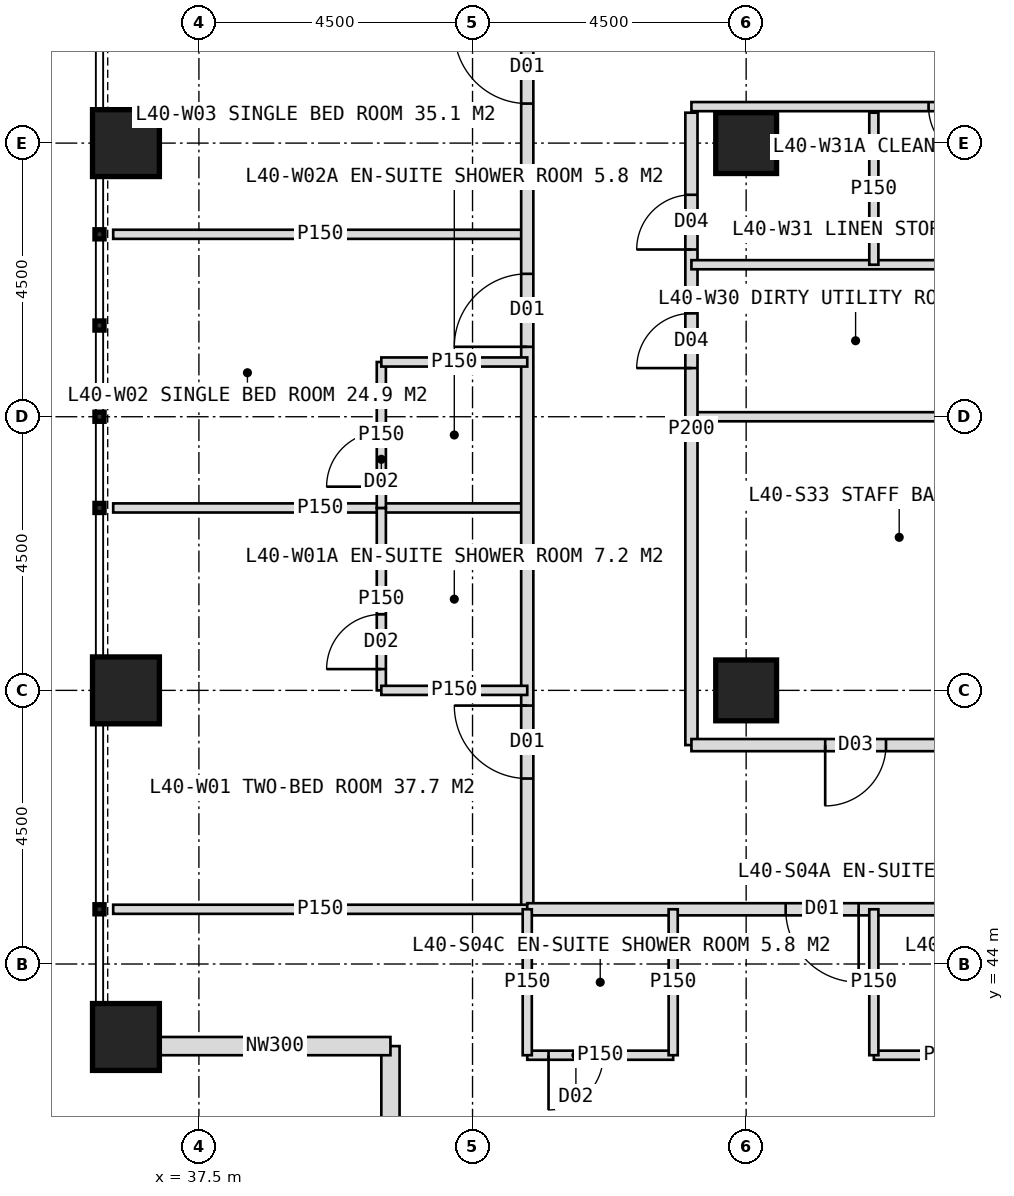
"""IFC4 building model, lengths in metres.
Left out: names, types, materials, properties, quantities, classifications, styles, units other than length and angle.
Written with IfcOpenShell. Run it as: python <this file> out.ifc"""

import sys

from ifc_helpers import new_model, si_unit, direction, frame, frame_2d, origin, origin_2d, place, context, subcontext, project, spatial, rectangle, hollow_rectangle, extrude, element, fill, save


model = new_model("IFC4")
c1 = context("Model", 3, precision=1e-05, world=origin(), true_north=direction((0.0, 1.0)))
c2 = subcontext(c1, "Body", "Model", "MODEL_VIEW")
j1 = project(units=[si_unit("LENGTHUNIT", "METRE"), si_unit("PLANEANGLEUNIT", "RADIAN")], contexts=[c1])
p1 = place(None, origin())
s1 = spatial("IfcSite", under=j1, at=p1, CompositionType="ELEMENT")
p2 = place(p1, origin())
s2 = spatial("IfcBuilding", under=s1, at=p2, CompositionType="ELEMENT")
p3 = place(p2, frame((0.0, 0.0, 168.0)))
s3 = spatial("IfcBuildingStorey", under=s2, at=p3, CompositionType="ELEMENT", Elevation=168.0)
for number, where, z_axis, x_axis in (
    (1, (46.5, 48.5, 0.0), (0.0, 0.0, 1.0), (1.0, 0.0, 0.0)),
    (2, (46.5, 57.5, 0.0), (0.0, 0.0, 1.0), (1.0, 0.0, 0.0)),
):
    element("IfcColumn", number, at=place(p3, frame(where, z_axis=z_axis, x_axis=x_axis)), inside=s3, PredefinedType="COLUMN", context=c2, shape_type="SweptSolid", body=[
        extrude(hollow_rectangle(XDim=1.0, YDim=1.0, WallThickness=0.1, at=origin_2d()), origin(), (0.0, 0.0, 1.0), 4.0),
    ])
for number, where, z_axis, x_axis in (
    (3, (36.3, 42.8, 0.0), (0.0, 0.0, 1.0), (1.0, 0.0, 0.0)),
    (4, (36.3, 48.5, 0.0), (0.0, 0.0, 1.0), (1.0, 0.0, 0.0)),
    (5, (36.3, 57.5, 0.0), (0.0, 0.0, 1.0), (1.0, 0.0, 0.0)),
):
    element("IfcColumn", number, at=place(p3, frame(where, z_axis=z_axis, x_axis=x_axis)), inside=s3, PredefinedType="COLUMN", context=c2, shape_type="SweptSolid", body=[
        extrude(hollow_rectangle(XDim=1.1, YDim=1.1, WallThickness=0.1, at=origin_2d()), origin(), (0.0, 0.0, 1.0), 4.0),
    ])
for number, where, z_axis, x_axis in (
    (6, (40.65, 38.85, 0.0), (0.0, 0.0, 1.0), (0.0, 1.0, 0.0)),
    (7, (40.65, 42.65, 0.0), (0.0, 0.0, 1.0), (-1.0, 0.0, 0.0)),
):
    element("IfcWall", number, at=place(p3, frame(where, z_axis=z_axis, x_axis=x_axis)), inside=s3, PredefinedType="ELEMENTEDWALL", context=c2, shape_type="SweptSolid", body=[
        extrude(rectangle(XDim=3.8, YDim=0.3, at=frame_2d((1.9, 0.0))), origin(), (0.0, 0.0, 1.0), 4.0),
    ])
for number, where, z_axis, x_axis in (
    (8, (42.9, 51.5, 0.0), (0.0, 0.0, 1.0), (-1.0, 0.0, 0.0)),
    (9, (42.9, 56.0, 0.0), (0.0, 0.0, 1.0), (-1.0, 0.0, 0.0)),
):
    element("IfcWall", number, at=place(p3, frame(where, z_axis=z_axis, x_axis=x_axis)), inside=s3, PredefinedType="PARTITIONING", context=c2, shape_type="SweptSolid", body=[
        extrude(rectangle(XDim=6.81, YDim=0.15, at=frame_2d((3.405, 0.0))), origin(), (0.0, 0.0, 1.0), 3.75),
    ])
p4 = place(p3, frame((42.9, 44.9, 0.0), z_axis=(0.0, 0.0, 1.0), x_axis=(0.0, 1.0, 0.0)))
e10 = element("IfcWall", 10, at=p4, inside=s3, PredefinedType="PARTITIONING", context=c2, shape_type="SweptSolid", body=[
    extrude(rectangle(XDim=34.2, YDim=0.2, at=frame_2d((17.1, 0.0))), origin(), (0.0, 0.0, 1.0), 3.75),
])
p5 = place(p4, frame((2.15, 0.0, 0.0)))
e11 = element("IfcOpeningElement", 11, at=p5, cuts=e10, PredefinedType="OPENING", context=c2, shape_type="SweptSolid", body=[
    extrude(rectangle(XDim=1.2, YDim=2.2, at=frame_2d((0.6, 1.1))), frame((0.0, 0.11, 0.0), z_axis=(0.0, -1.0, 0.0), x_axis=(1.0, 0.0, 0.0)), (0.0, 0.0, 1.0), 0.22),
])
p6 = place(p4, frame((9.25, 0.0, 0.0)))
e12 = element("IfcOpeningElement", 12, at=p6, cuts=e10, PredefinedType="OPENING", context=c2, shape_type="SweptSolid", body=[
    extrude(rectangle(XDim=1.2, YDim=2.2, at=frame_2d((0.6, 1.1))), frame((0.0, 0.11, 0.0), z_axis=(0.0, -1.0, 0.0), x_axis=(1.0, 0.0, 0.0)), (0.0, 0.0, 1.0), 0.22),
])
p7 = place(p4, frame((13.25, 0.0, 0.0)))
e13 = element("IfcOpeningElement", 13, at=p7, cuts=e10, PredefinedType="OPENING", context=c2, shape_type="SweptSolid", body=[
    extrude(rectangle(XDim=1.2, YDim=2.2, at=frame_2d((0.6, 1.1))), frame((0.0, 0.11, 0.0), z_axis=(0.0, -1.0, 0.0), x_axis=(1.0, 0.0, 0.0)), (0.0, 0.0, 1.0), 0.22),
])
p8 = place(p4, frame((19.75, 0.0, 0.0)))
e14 = element("IfcOpeningElement", 14, at=p8, cuts=e10, PredefinedType="OPENING", context=c2, shape_type="SweptSolid", body=[
    extrude(rectangle(XDim=1.2, YDim=2.2, at=frame_2d((0.6, 1.1))), frame((0.0, 0.11, 0.0), z_axis=(0.0, -1.0, 0.0), x_axis=(1.0, 0.0, 0.0)), (0.0, 0.0, 1.0), 0.22),
])
p9 = place(p4, frame((30.35, 0.0, 0.0)))
e15 = element("IfcOpeningElement", 15, at=p9, cuts=e10, PredefinedType="OPENING", context=c2, shape_type="SweptSolid", body=[
    extrude(rectangle(XDim=1.2, YDim=2.2, at=frame_2d((0.6, 1.1))), frame((0.0, 0.11, 0.0), z_axis=(0.0, -1.0, 0.0), x_axis=(1.0, 0.0, 0.0)), (0.0, 0.0, 1.0), 0.22),
])
p10 = place(p3, frame((42.9, 44.9, 0.0), z_axis=(0.0, 0.0, 1.0), x_axis=(-1.0, 0.0, 0.0)))
e16 = element("IfcWall", 16, at=p10, inside=s3, PredefinedType="PARTITIONING", context=c2, shape_type="SweptSolid", body=[
    extrude(rectangle(XDim=6.81, YDim=0.15, at=frame_2d((3.405, 0.0))), origin(), (0.0, 0.0, 1.0), 3.75),
])
p11 = place(p3, frame((40.5, 48.5, 0.0), z_axis=(0.0, 0.0, 1.0), x_axis=(0.0, 1.0, 0.0)))
e17 = element("IfcWall", 17, at=p11, inside=s3, PredefinedType="PARTITIONING", context=c2, shape_type="SweptSolid", body=[
    extrude(rectangle(XDim=3.0, YDim=0.15, at=frame_2d((1.5, 0.0))), origin(), (0.0, 0.0, 1.0), 3.75),
])
p12 = place(p11, frame((0.35, 0.0, 0.0)))
e18 = element("IfcOpeningElement", 18, at=p12, cuts=e17, PredefinedType="OPENING", context=c2, shape_type="SweptSolid", body=[
    extrude(rectangle(XDim=0.9, YDim=2.1, at=frame_2d((0.45, 1.05))), frame((0.0, 0.085, 0.0), z_axis=(0.0, -1.0, 0.0), x_axis=(1.0, 0.0, 0.0)), (0.0, 0.0, 1.0), 0.17),
])
p13 = place(p3, frame((42.9, 48.5, 0.0), z_axis=(0.0, 0.0, 1.0), x_axis=(-1.0, 0.0, 0.0)))
e19 = element("IfcWall", 19, at=p13, inside=s3, PredefinedType="PARTITIONING", context=c2, shape_type="SweptSolid", body=[
    extrude(rectangle(XDim=2.4, YDim=0.15, at=frame_2d((1.2, 0.0))), origin(), (0.0, 0.0, 1.0), 2.75),
])
p14 = place(p3, frame((40.5, 51.5, 0.0), z_axis=(0.0, 0.0, 1.0), x_axis=(0.0, 1.0, 0.0)))
e20 = element("IfcWall", 20, at=p14, inside=s3, PredefinedType="PARTITIONING", context=c2, shape_type="SweptSolid", body=[
    extrude(rectangle(XDim=2.4, YDim=0.15, at=frame_2d((1.2, 0.0))), origin(), (0.0, 0.0, 1.0), 3.75),
])
p15 = place(p14, frame((0.35, 0.0, 0.0)))
e21 = element("IfcOpeningElement", 21, at=p15, cuts=e20, PredefinedType="OPENING", context=c2, shape_type="SweptSolid", body=[
    extrude(rectangle(XDim=0.9, YDim=2.1, at=frame_2d((0.45, 1.05))), frame((0.0, 0.085, 0.0), z_axis=(0.0, -1.0, 0.0), x_axis=(1.0, 0.0, 0.0)), (0.0, 0.0, 1.0), 0.17),
])
p16 = place(p3, frame((42.9, 53.9, 0.0), z_axis=(0.0, 0.0, 1.0), x_axis=(-1.0, 0.0, 0.0)))
e22 = element("IfcWall", 22, at=p16, inside=s3, PredefinedType="PARTITIONING", context=c2, shape_type="SweptSolid", body=[
    extrude(rectangle(XDim=2.4, YDim=0.15, at=frame_2d((1.2, 0.0))), origin(), (0.0, 0.0, 1.0), 3.75),
])
p17 = place(p3, frame((51.0, 53.0, 0.0), z_axis=(0.0, 0.0, 1.0), x_axis=(-1.0, 0.0, 0.0)))
e23 = element("IfcWall", 23, at=p17, inside=s3, PredefinedType="PARTITIONING", context=c2, shape_type="SweptSolid", body=[
    extrude(rectangle(XDim=5.4, YDim=0.15, at=frame_2d((2.7, 0.0))), origin(), (0.0, 0.0, 1.0), 3.75),
])
p18 = place(p3, frame((45.6, 47.6, 0.0), z_axis=(0.0, 0.0, 1.0), x_axis=(0.0, 1.0, 0.0)))
e24 = element("IfcWall", 24, at=p18, inside=s3, PredefinedType="PARTITIONING", context=c2, shape_type="SweptSolid", body=[
    extrude(rectangle(XDim=10.4, YDim=0.2, at=frame_2d((5.2, 0.0))), origin(), (0.0, 0.0, 1.0), 3.75),
])
p19 = place(p18, frame((6.2, 0.0, 0.0)))
e25 = element("IfcOpeningElement", 25, at=p19, cuts=e24, PredefinedType="OPENING", context=c2, shape_type="SweptSolid", body=[
    extrude(rectangle(XDim=0.9, YDim=2.1, at=frame_2d((0.45, 1.05))), frame((0.0, 0.11, 0.0), z_axis=(0.0, -1.0, 0.0), x_axis=(1.0, 0.0, 0.0)), (0.0, 0.0, 1.0), 0.22),
])
p20 = place(p18, frame((8.15, 0.0, 0.0)))
e26 = element("IfcOpeningElement", 26, at=p20, cuts=e24, PredefinedType="OPENING", context=c2, shape_type="SweptSolid", body=[
    extrude(rectangle(XDim=0.9, YDim=2.1, at=frame_2d((0.45, 1.05))), frame((0.0, 0.11, 0.0), z_axis=(0.0, -1.0, 0.0), x_axis=(1.0, 0.0, 0.0)), (0.0, 0.0, 1.0), 0.22),
])
p21 = place(p3, frame((51.0, 58.1, 0.0), z_axis=(0.0, 0.0, 1.0), x_axis=(-1.0, 0.0, 0.0)))
e27 = element("IfcWall", 27, at=p21, inside=s3, PredefinedType="PARTITIONING", context=c2, shape_type="SweptSolid", body=[
    extrude(rectangle(XDim=5.4, YDim=0.15, at=frame_2d((2.7, 0.0))), origin(), (0.0, 0.0, 1.0), 3.75),
])
p22 = place(p21, frame((0.6, 0.0, 0.0)))
e28 = element("IfcOpeningElement", 28, at=p22, cuts=e27, PredefinedType="OPENING", context=c2, shape_type="SweptSolid", body=[
    extrude(rectangle(XDim=0.9, YDim=2.1, at=frame_2d((0.45, 1.05))), frame((0.0, 0.085, 0.0), z_axis=(0.0, -1.0, 0.0), x_axis=(1.0, 0.0, 0.0)), (0.0, 0.0, 1.0), 0.17),
])
p23 = place(p3, frame((51.0, 55.5, 0.0), z_axis=(0.0, 0.0, 1.0), x_axis=(-1.0, 0.0, 0.0)))
e29 = element("IfcWall", 29, at=p23, inside=s3, PredefinedType="PARTITIONING", context=c2, shape_type="SweptSolid", body=[
    extrude(rectangle(XDim=5.4, YDim=0.15, at=frame_2d((2.7, 0.0))), origin(), (0.0, 0.0, 1.0), 3.75),
])
p24 = place(p3, frame((48.6, 55.5, 0.0), z_axis=(0.0, 0.0, 1.0), x_axis=(0.0, 1.0, 0.0)))
e30 = element("IfcWall", 30, at=p24, inside=s3, PredefinedType="PARTITIONING", context=c2, shape_type="SweptSolid", body=[
    extrude(rectangle(XDim=2.5, YDim=0.15, at=frame_2d((1.25, 0.0))), origin(), (0.0, 0.0, 1.0), 3.75),
])
p25 = place(p3, frame((77.1, 44.9, 0.0), z_axis=(0.0, 0.0, 1.0), x_axis=(-1.0, 0.0, 0.0)))
e31 = element("IfcWall", 31, at=p25, inside=s3, PredefinedType="PARTITIONING", context=c2, shape_type="SweptSolid", body=[
    extrude(rectangle(XDim=34.2, YDim=0.2, at=frame_2d((17.1, 0.0))), origin(), (0.0, 0.0, 1.0), 3.75),
])
p26 = place(p25, frame((4.25, 0.0, 0.0)))
e32 = element("IfcOpeningElement", 32, at=p26, cuts=e31, PredefinedType="OPENING", context=c2, shape_type="SweptSolid", body=[
    extrude(rectangle(XDim=1.2, YDim=2.2, at=frame_2d((0.6, 1.1))), frame((0.0, 0.11, 0.0), z_axis=(0.0, -1.0, 0.0), x_axis=(1.0, 0.0, 0.0)), (0.0, 0.0, 1.0), 0.22),
])
p27 = place(p25, frame((10.75, 0.0, 0.0)))
e33 = element("IfcOpeningElement", 33, at=p27, cuts=e31, PredefinedType="OPENING", context=c2, shape_type="SweptSolid", body=[
    extrude(rectangle(XDim=1.2, YDim=2.2, at=frame_2d((0.6, 1.1))), frame((0.0, 0.11, 0.0), z_axis=(0.0, -1.0, 0.0), x_axis=(1.0, 0.0, 0.0)), (0.0, 0.0, 1.0), 0.22),
])
p28 = place(p25, frame((22.25, 0.0, 0.0)))
e34 = element("IfcOpeningElement", 34, at=p28, cuts=e31, PredefinedType="OPENING", context=c2, shape_type="SweptSolid", body=[
    extrude(rectangle(XDim=1.2, YDim=2.2, at=frame_2d((0.6, 1.1))), frame((0.0, 0.11, 0.0), z_axis=(0.0, -1.0, 0.0), x_axis=(1.0, 0.0, 0.0)), (0.0, 0.0, 1.0), 0.22),
])
p29 = place(p25, frame((28.75, 0.0, 0.0)))
e35 = element("IfcOpeningElement", 35, at=p29, cuts=e31, PredefinedType="OPENING", context=c2, shape_type="SweptSolid", body=[
    extrude(rectangle(XDim=1.2, YDim=2.2, at=frame_2d((0.6, 1.1))), frame((0.0, 0.11, 0.0), z_axis=(0.0, -1.0, 0.0), x_axis=(1.0, 0.0, 0.0)), (0.0, 0.0, 1.0), 0.22),
])
p30 = place(p3, frame((51.0, 42.5, 0.0), z_axis=(0.0, 0.0, 1.0), x_axis=(-1.0, 0.0, 0.0)))
e36 = element("IfcWall", 36, at=p30, inside=s3, PredefinedType="PARTITIONING", context=c2, shape_type="SweptSolid", body=[
    extrude(rectangle(XDim=2.4, YDim=0.15, at=frame_2d((1.2, 0.0))), origin(), (0.0, 0.0, 1.0), 3.75),
])
p31 = place(p30, frame((0.35, 0.0, 0.0)))
e37 = element("IfcOpeningElement", 37, at=p31, cuts=e36, PredefinedType="OPENING", context=c2, shape_type="SweptSolid", body=[
    extrude(rectangle(XDim=0.9, YDim=2.1, at=frame_2d((0.45, 1.05))), frame((0.0, 0.085, 0.0), z_axis=(0.0, -1.0, 0.0), x_axis=(1.0, 0.0, 0.0)), (0.0, 0.0, 1.0), 0.17),
])
p32 = place(p3, frame((48.6, 44.9, 0.0), z_axis=(0.0, 0.0, 1.0), x_axis=(0.0, -1.0, 0.0)))
e38 = element("IfcWall", 38, at=p32, inside=s3, PredefinedType="PARTITIONING", context=c2, shape_type="SweptSolid", body=[
    extrude(rectangle(XDim=2.4, YDim=0.15, at=frame_2d((1.2, 0.0))), origin(), (0.0, 0.0, 1.0), 3.75),
])
p33 = place(p3, frame((45.3, 42.5, 0.0), z_axis=(0.0, 0.0, 1.0), x_axis=(-1.0, 0.0, 0.0)))
e39 = element("IfcWall", 39, at=p33, inside=s3, PredefinedType="PARTITIONING", context=c2, shape_type="SweptSolid", body=[
    extrude(rectangle(XDim=2.4, YDim=0.15, at=frame_2d((1.2, 0.0))), origin(), (0.0, 0.0, 1.0), 3.75),
])
p34 = place(p33, frame((1.15, 0.0, 0.0)))
e40 = element("IfcOpeningElement", 40, at=p34, cuts=e39, PredefinedType="OPENING", context=c2, shape_type="SweptSolid", body=[
    extrude(rectangle(XDim=0.9, YDim=2.1, at=frame_2d((0.45, 1.05))), frame((0.0, 0.085, 0.0), z_axis=(0.0, -1.0, 0.0), x_axis=(1.0, 0.0, 0.0)), (0.0, 0.0, 1.0), 0.17),
])
for number, where, z_axis, x_axis in (
    (41, (45.3, 44.9, 0.0), (0.0, 0.0, 1.0), (0.0, -1.0, 0.0)),
    (42, (42.9, 44.9, 0.0), (0.0, 0.0, 1.0), (0.0, -1.0, 0.0)),
):
    element("IfcWall", number, at=place(p3, frame(where, z_axis=z_axis, x_axis=x_axis)), inside=s3, PredefinedType="PARTITIONING", context=c2, shape_type="SweptSolid", body=[
        extrude(rectangle(XDim=2.4, YDim=0.15, at=frame_2d((1.2, 0.0))), origin(), (0.0, 0.0, 1.0), 3.75),
    ])
p35 = place(p3, frame((57.75, 47.6, 0.0), z_axis=(0.0, 0.0, 1.0), x_axis=(-1.0, 0.0, 0.0)))
e43 = element("IfcWall", 43, at=p35, inside=s3, PredefinedType="PARTITIONING", context=c2, shape_type="SweptSolid", body=[
    extrude(rectangle(XDim=12.15, YDim=0.2, at=frame_2d((6.075, 0.0))), origin(), (0.0, 0.0, 1.0), 3.75),
])
p36 = place(p35, frame((4.3, 0.0, 0.0)))
e44 = element("IfcOpeningElement", 44, at=p36, cuts=e43, PredefinedType="OPENING", context=c2, shape_type="SweptSolid", body=[
    extrude(rectangle(XDim=1.0, YDim=2.1, at=frame_2d((0.5, 1.05))), frame((0.0, 0.11, 0.0), z_axis=(0.0, -1.0, 0.0), x_axis=(1.0, 0.0, 0.0)), (0.0, 0.0, 1.0), 0.22),
])
p37 = place(p35, frame((8.95, 0.0, 0.0)))
e45 = element("IfcOpeningElement", 45, at=p37, cuts=e43, PredefinedType="OPENING", context=c2, shape_type="SweptSolid", body=[
    extrude(rectangle(XDim=1.0, YDim=2.1, at=frame_2d((0.5, 1.05))), frame((0.0, 0.11, 0.0), z_axis=(0.0, -1.0, 0.0), x_axis=(1.0, 0.0, 0.0)), (0.0, 0.0, 1.0), 0.22),
])
p38 = place(p5, origin())
e46 = element("IfcDoor", 46, at=p38, inside=s3, OperationType="SINGLE_SWING_RIGHT", PredefinedType="DOOR", context=c2, shape_type="SweptSolid", body=[
    extrude(rectangle(XDim=1.2, YDim=2.2, at=frame_2d((0.6, 1.1))), frame((0.0, 0.025, 0.0), z_axis=(0.0, -1.0, 0.0), x_axis=(1.0, 0.0, 0.0)), (0.0, 0.0, 1.0), 0.05),
])
fill(e11, e46)
p39 = place(p12, origin())
e47 = element("IfcDoor", 47, at=p39, inside=s3, OperationType="SINGLE_SWING_LEFT", PredefinedType="DOOR", context=c2, shape_type="SweptSolid", body=[
    extrude(rectangle(XDim=0.9, YDim=2.1, at=frame_2d((0.45, 1.05))), frame((0.0, 0.025, 0.0), z_axis=(0.0, -1.0, 0.0), x_axis=(1.0, 0.0, 0.0)), (0.0, 0.0, 1.0), 0.05),
])
fill(e18, e47)
p40 = place(p6, origin())
e48 = element("IfcDoor", 48, at=p40, inside=s3, OperationType="SINGLE_SWING_LEFT", PredefinedType="DOOR", context=c2, shape_type="SweptSolid", body=[
    extrude(rectangle(XDim=1.2, YDim=2.2, at=frame_2d((0.6, 1.1))), frame((0.0, 0.025, 0.0), z_axis=(0.0, -1.0, 0.0), x_axis=(1.0, 0.0, 0.0)), (0.0, 0.0, 1.0), 0.05),
])
fill(e12, e48)
p41 = place(p15, origin())
e49 = element("IfcDoor", 49, at=p41, inside=s3, OperationType="SINGLE_SWING_LEFT", PredefinedType="DOOR", context=c2, shape_type="SweptSolid", body=[
    extrude(rectangle(XDim=0.9, YDim=2.1, at=frame_2d((0.45, 1.05))), frame((0.0, 0.025, 0.0), z_axis=(0.0, -1.0, 0.0), x_axis=(1.0, 0.0, 0.0)), (0.0, 0.0, 1.0), 0.05),
])
fill(e21, e49)
p42 = place(p7, origin())
e50 = element("IfcDoor", 50, at=p42, inside=s3, OperationType="SINGLE_SWING_RIGHT", PredefinedType="DOOR", context=c2, shape_type="SweptSolid", body=[
    extrude(rectangle(XDim=1.2, YDim=2.2, at=frame_2d((0.6, 1.1))), frame((0.0, 0.025, 0.0), z_axis=(0.0, -1.0, 0.0), x_axis=(1.0, 0.0, 0.0)), (0.0, 0.0, 1.0), 0.05),
])
fill(e13, e50)
p43 = place(p19, origin())
e51 = element("IfcDoor", 51, at=p43, inside=s3, OperationType="SINGLE_SWING_LEFT", PredefinedType="DOOR", context=c2, shape_type="SweptSolid", body=[
    extrude(rectangle(XDim=0.9, YDim=2.1, at=frame_2d((0.45, 1.05))), frame((0.0, 0.025, 0.0), z_axis=(0.0, -1.0, 0.0), x_axis=(1.0, 0.0, 0.0)), (0.0, 0.0, 1.0), 0.05),
])
fill(e25, e51)
p44 = place(p22, origin())
e52 = element("IfcDoor", 52, at=p44, inside=s3, OperationType="SINGLE_SWING_LEFT", PredefinedType="DOOR", context=c2, shape_type="SweptSolid", body=[
    extrude(rectangle(XDim=0.9, YDim=2.1, at=frame_2d((0.45, 1.05))), frame((0.0, 0.025, 0.0), z_axis=(0.0, -1.0, 0.0), x_axis=(1.0, 0.0, 0.0)), (0.0, 0.0, 1.0), 0.05),
])
fill(e28, e52)
p45 = place(p20, origin())
e53 = element("IfcDoor", 53, at=p45, inside=s3, OperationType="SINGLE_SWING_LEFT", PredefinedType="DOOR", context=c2, shape_type="SweptSolid", body=[
    extrude(rectangle(XDim=0.9, YDim=2.1, at=frame_2d((0.45, 1.05))), frame((0.0, 0.025, 0.0), z_axis=(0.0, -1.0, 0.0), x_axis=(1.0, 0.0, 0.0)), (0.0, 0.0, 1.0), 0.05),
])
fill(e26, e53)
p46 = place(p29, origin())
e54 = element("IfcDoor", 54, at=p46, inside=s3, OperationType="SINGLE_SWING_LEFT", PredefinedType="DOOR", context=c2, shape_type="SweptSolid", body=[
    extrude(rectangle(XDim=1.2, YDim=2.2, at=frame_2d((0.6, 1.1))), frame((0.0, 0.025, 0.0), z_axis=(0.0, -1.0, 0.0), x_axis=(1.0, 0.0, 0.0)), (0.0, 0.0, 1.0), 0.05),
])
fill(e35, e54)
p47 = place(p34, origin())
e55 = element("IfcDoor", 55, at=p47, inside=s3, OperationType="SINGLE_SWING_RIGHT", PredefinedType="DOOR", context=c2, shape_type="SweptSolid", body=[
    extrude(rectangle(XDim=0.9, YDim=2.1, at=frame_2d((0.45, 1.05))), frame((0.0, 0.025, 0.0), z_axis=(0.0, -1.0, 0.0), x_axis=(1.0, 0.0, 0.0)), (0.0, 0.0, 1.0), 0.05),
])
fill(e40, e55)
p48 = place(p37, origin())
e56 = element("IfcDoor", 56, at=p48, inside=s3, OperationType="SINGLE_SWING_RIGHT", PredefinedType="DOOR", context=c2, shape_type="SweptSolid", body=[
    extrude(rectangle(XDim=1.0, YDim=2.1, at=frame_2d((0.5, 1.05))), frame((0.0, 0.025, 0.0), z_axis=(0.0, -1.0, 0.0), x_axis=(1.0, 0.0, 0.0)), (0.0, 0.0, 1.0), 0.05),
])
fill(e45, e56)
save(model, sys.argv[1])
